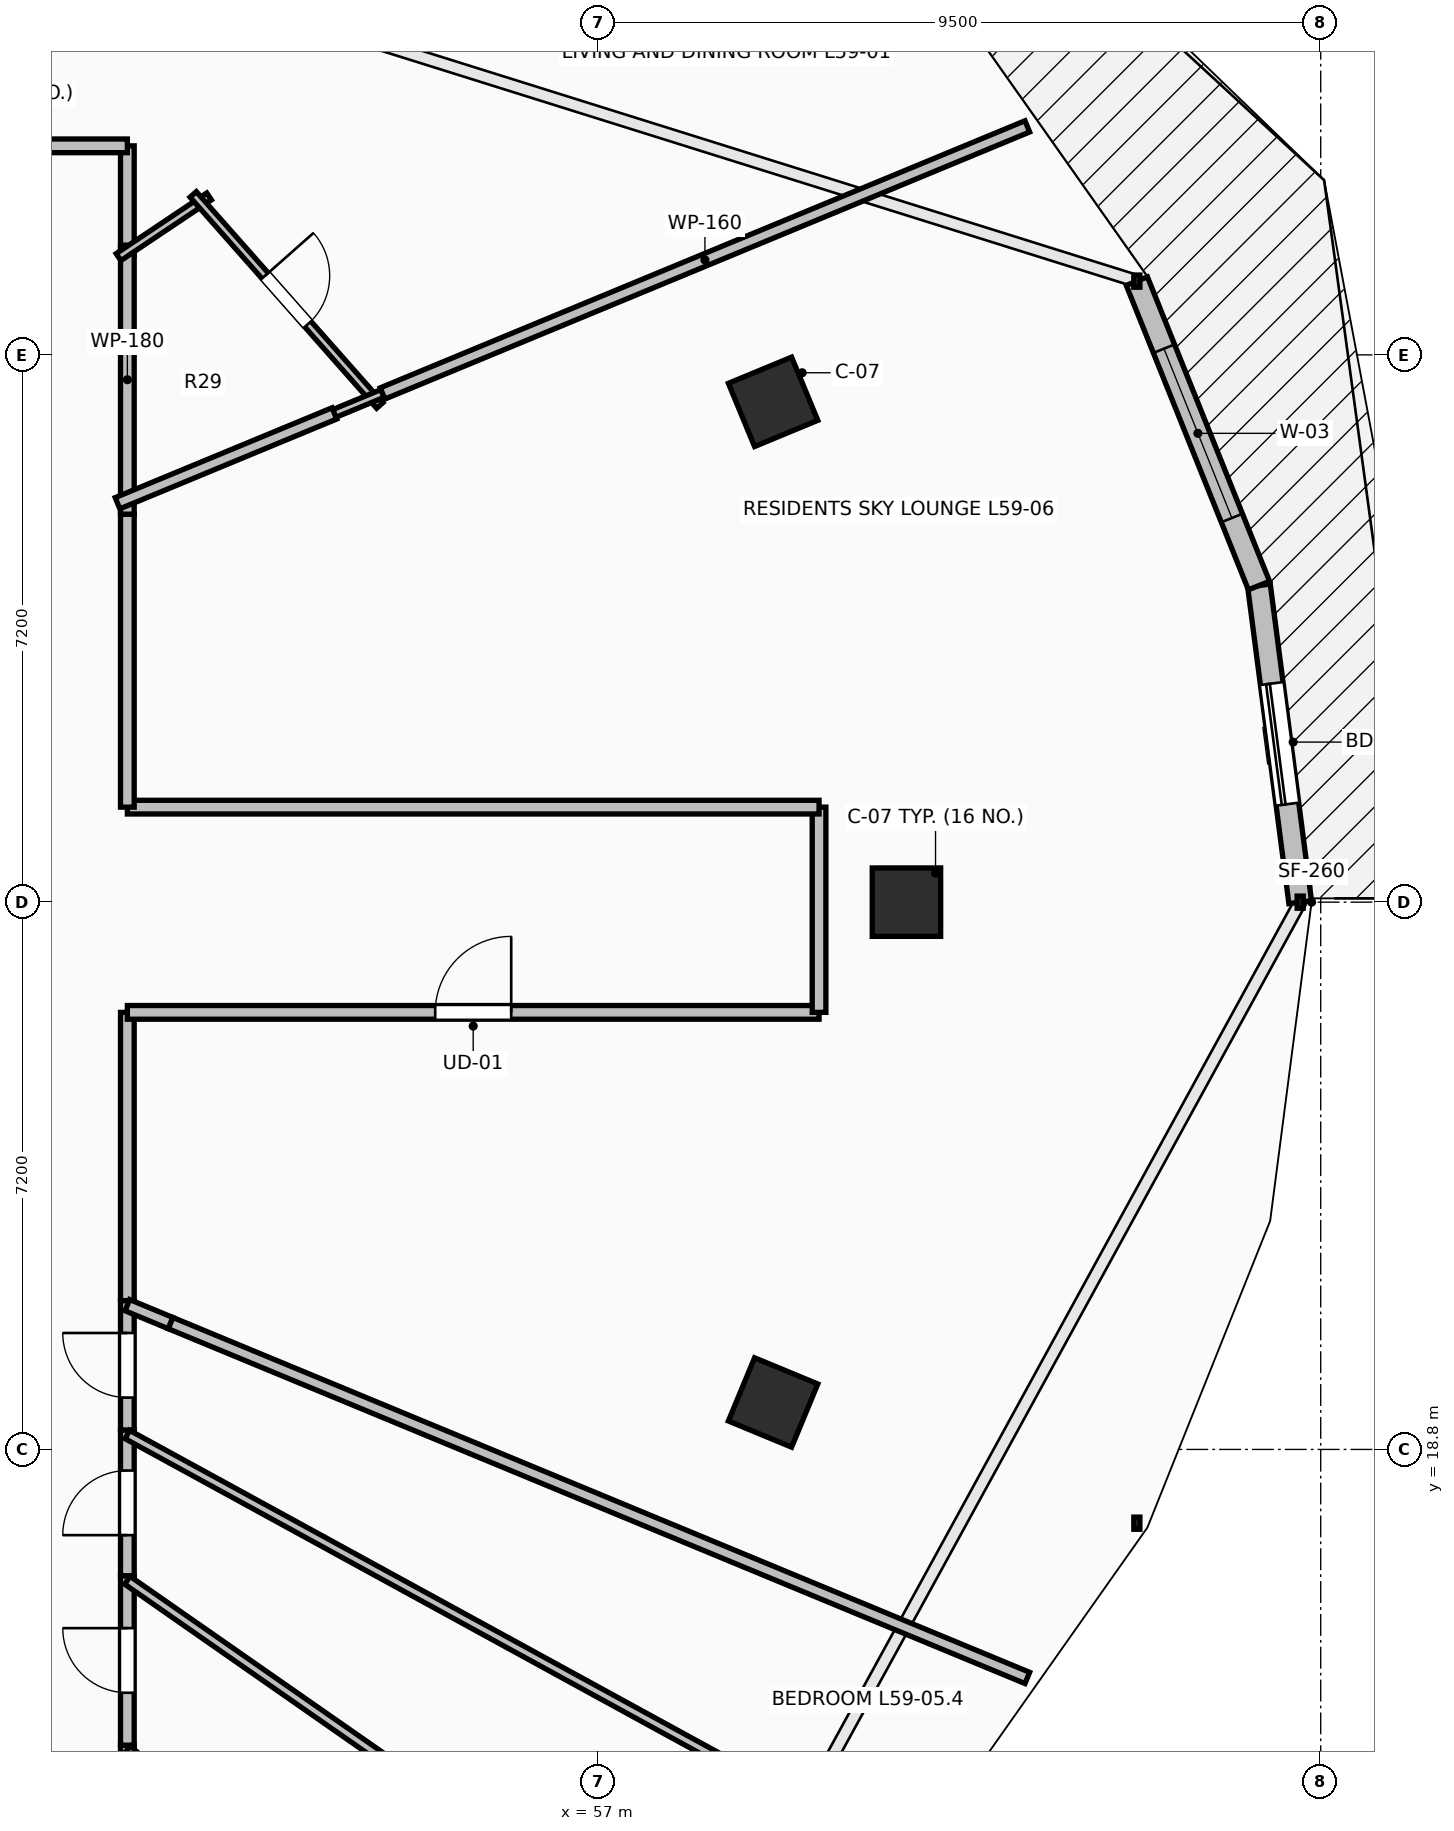
"""IFC4 building model, lengths in metres.
Left out: names, types, materials, properties, quantities, classifications, styles, units other than length and angle.
Written with IfcOpenShell. Run it as: python <this file> out.ifc"""

import sys

from ifc_helpers import new_model, si_unit, direction, frame, frame_2d, origin, origin_2d, place, context, subcontext, project, spatial, rectangle, extrude, element, fill, save


model = new_model("IFC4")
c1 = context("Model", 3, precision=1e-05, world=origin(), true_north=direction((0.0, 1.0)))
c2 = subcontext(c1, "Body", "Model", "MODEL_VIEW")
j1 = project(units=[si_unit("LENGTHUNIT", "METRE"), si_unit("PLANEANGLEUNIT", "RADIAN")], contexts=[c1])
p1 = place(None, origin())
s1 = spatial("IfcSite", under=j1, at=p1, CompositionType="ELEMENT")
p2 = place(p1, origin())
s2 = spatial("IfcBuilding", under=s1, at=p2, CompositionType="ELEMENT")
p3 = place(p2, frame((0.0, 0.0, 217.85)))
s3 = spatial("IfcBuildingStorey", under=s2, at=p3, CompositionType="ELEMENT", Elevation=217.85)
for number, where, z_axis, x_axis in (
    (1, (61.05, 26.0, 0.0), (0.0, 0.0, 1.0), (1.0, 0.0, 0.0)),
    (2, (59.295, 32.582, 0.0), (0.0, 0.0, 1.0), (0.924, 0.383, 0.0)),
    (3, (59.295, 19.418, 0.0), (0.0, 0.0, 1.0), (0.924, -0.383, 0.0)),
):
    element("IfcColumn", number, at=place(p3, frame(where, z_axis=z_axis, x_axis=x_axis)), inside=s3, PredefinedType="COLUMN", context=c2, shape_type="SweptSolid", body=[
        extrude(rectangle(XDim=0.9, YDim=0.9, at=origin_2d()), origin(), (0.0, 0.0, 1.0), 3.55),
    ])
p4 = place(p3, frame((66.23, 26.0, 0.0), z_axis=(0.0, 0.0, 1.0), x_axis=(-0.129147853268, 0.991625348605, 0.0)))
e4 = element("IfcWall", 4, at=p4, inside=s3, PredefinedType="STANDARD", context=c2, shape_type="SweptSolid", body=[
    extrude(rectangle(XDim=4.2, YDim=0.3, at=frame_2d((2.1, 0.0))), origin(), (0.0, 0.0, 1.0), 3.29),
])
p5 = place(p4, frame((1.3, 0.0, 0.0)))
e5 = element("IfcOpeningElement", 5, at=p5, cuts=e4, PredefinedType="OPENING", context=c2, shape_type="SweptSolid", body=[
    extrude(rectangle(XDim=1.6, YDim=2.3, at=frame_2d((0.8, 1.15))), frame((0.0, 0.165, 0.0), z_axis=(0.0, -1.0, 0.0), x_axis=(1.0, 0.0, 0.0)), (0.0, 0.0, 1.0), 0.33),
])
p6 = place(p3, frame((65.688, 30.165, 0.0), z_axis=(0.0, 0.0, 1.0), x_axis=(-0.372268409848, 0.928125116043, 0.0)))
e6 = element("IfcWall", 6, at=p6, inside=s3, PredefinedType="STANDARD", context=c2, shape_type="SweptSolid", body=[
    extrude(rectangle(XDim=4.315, YDim=0.3, at=frame_2d((2.158, 0.0))), origin(), (0.0, 0.0, 1.0), 3.29),
])
p7 = place(p6, frame((0.958, 0.0, 0.85)))
e7 = element("IfcOpeningElement", 7, at=p7, cuts=e6, PredefinedType="OPENING", context=c2, shape_type="SweptSolid", body=[
    extrude(rectangle(XDim=2.4, YDim=2.24, at=frame_2d((1.2, 1.12))), frame((0.0, 0.165, 0.0), z_axis=(0.0, -1.0, 0.0), x_axis=(1.0, 0.0, 0.0)), (0.0, 0.0, 1.0), 0.33),
])
p8 = place(p3, frame((50.8, 34.504, 0.0), z_axis=(0.0, 0.0, 1.0), x_axis=(0.0, 1.0, 0.0)))
e8 = element("IfcWall", 8, at=p8, inside=s3, PredefinedType="PARTITIONING", context=c2, shape_type="SweptSolid", body=[
    extrude(rectangle(XDim=1.446, YDim=0.18, at=frame_2d((0.723, 0.0))), origin(), (0.0, 0.0, 1.0), 2.482),
])
p9 = place(p3, frame((50.8, 35.95, 0.0), z_axis=(0.0, 0.0, 1.0), x_axis=(-1.0, 0.0, 0.0)))
e9 = element("IfcWall", 9, at=p9, inside=s3, PredefinedType="PARTITIONING", context=c2, shape_type="SweptSolid", body=[
    extrude(rectangle(XDim=3.948, YDim=0.18, at=frame_2d((1.974, 0.0))), origin(), (0.0, 0.0, 1.0), 2.482),
])
p10 = place(p9, frame((1.474, 0.0, 0.0)))
e10 = element("IfcOpeningElement", 10, at=p10, cuts=e9, PredefinedType="OPENING", context=c2, shape_type="SweptSolid", body=[
    extrude(rectangle(XDim=1.0, YDim=2.15, at=frame_2d((0.5, 1.075))), frame((0.0, 0.105, 0.0), z_axis=(0.0, -1.0, 0.0), x_axis=(1.0, 0.0, 0.0)), (0.0, 0.0, 1.0), 0.21),
])
p11 = place(p3, frame((50.8, 31.102, 0.0), z_axis=(0.0, 0.0, 1.0), x_axis=(0.0, 1.0, 0.0)))
e11 = element("IfcWall", 11, at=p11, inside=s3, PredefinedType="PARTITIONING", context=c2, shape_type="SweptSolid", body=[
    extrude(rectangle(XDim=3.542, YDim=0.18, at=frame_2d((1.771, 0.0))), origin(), (0.0, 0.0, 1.0), 2.482),
])
p12 = place(p3, frame((50.8, 14.05, 0.0), z_axis=(0.0, 0.0, 1.0), x_axis=(0.0, 1.0, 0.0)))
e12 = element("IfcWall", 12, at=p12, inside=s3, PredefinedType="PARTITIONING", context=c2, shape_type="SweptSolid", body=[
    extrude(rectangle(XDim=0.859, YDim=0.18, at=frame_2d((0.429, 0.0))), origin(), (0.0, 0.0, 1.0), 2.979),
])
p13 = place(p3, frame((50.8, 14.909, 0.0), z_axis=(0.0, 0.0, 1.0), x_axis=(0.0, 1.0, 0.0)))
e13 = element("IfcWall", 13, at=p13, inside=s3, PredefinedType="PARTITIONING", context=c2, shape_type="SweptSolid", body=[
    extrude(rectangle(XDim=2.23, YDim=0.18, at=frame_2d((1.115, 0.0))), origin(), (0.0, 0.0, 1.0), 2.482),
])
p14 = place(p13, frame((0.69, 0.0, 0.0)))
e14 = element("IfcOpeningElement", 14, at=p14, cuts=e13, PredefinedType="OPENING", context=c2, shape_type="SweptSolid", body=[
    extrude(rectangle(XDim=0.85, YDim=2.1, at=frame_2d((0.425, 1.05))), frame((0.0, 0.105, 0.0), z_axis=(0.0, -1.0, 0.0), x_axis=(1.0, 0.0, 0.0)), (0.0, 0.0, 1.0), 0.21),
])
p15 = place(p3, frame((50.8, 17.139, 0.0), z_axis=(0.0, 0.0, 1.0), x_axis=(0.0, 1.0, 0.0)))
e15 = element("IfcWall", 15, at=p15, inside=s3, PredefinedType="PARTITIONING", context=c2, shape_type="SweptSolid", body=[
    extrude(rectangle(XDim=1.917, YDim=0.18, at=frame_2d((0.958, 0.0))), origin(), (0.0, 0.0, 1.0), 3.29),
])
p16 = place(p15, frame((0.533, 0.0, 0.0)))
e16 = element("IfcOpeningElement", 16, at=p16, cuts=e15, PredefinedType="OPENING", context=c2, shape_type="SweptSolid", body=[
    extrude(rectangle(XDim=0.85, YDim=2.1, at=frame_2d((0.425, 1.05))), frame((0.0, 0.105, 0.0), z_axis=(0.0, -1.0, 0.0), x_axis=(1.0, 0.0, 0.0)), (0.0, 0.0, 1.0), 0.21),
])
p17 = place(p3, frame((50.8, 19.056, 0.0), z_axis=(0.0, 0.0, 1.0), x_axis=(0.0, 1.0, 0.0)))
e17 = element("IfcWall", 17, at=p17, inside=s3, PredefinedType="PARTITIONING", context=c2, shape_type="SweptSolid", body=[
    extrude(rectangle(XDim=1.702, YDim=0.18, at=frame_2d((0.851, 0.0))), origin(), (0.0, 0.0, 1.0), 3.29),
])
p18 = place(p17, frame((0.426, 0.0, 0.0)))
e18 = element("IfcOpeningElement", 18, at=p18, cuts=e17, PredefinedType="OPENING", context=c2, shape_type="SweptSolid", body=[
    extrude(rectangle(XDim=0.85, YDim=2.1, at=frame_2d((0.425, 1.05))), frame((0.0, 0.105, 0.0), z_axis=(0.0, -1.0, 0.0), x_axis=(1.0, 0.0, 0.0)), (0.0, 0.0, 1.0), 0.21),
])
p19 = place(p3, frame((50.8, 20.758, 0.0), z_axis=(0.0, 0.0, 1.0), x_axis=(0.0, 1.0, 0.0)))
e19 = element("IfcWall", 19, at=p19, inside=s3, PredefinedType="PARTITIONING", context=c2, shape_type="SweptSolid", body=[
    extrude(rectangle(XDim=3.792, YDim=0.18, at=frame_2d((1.896, 0.0))), origin(), (0.0, 0.0, 1.0), 3.29),
])
p20 = place(p3, frame((50.8, 24.55, 0.0), z_axis=(0.0, 0.0, 1.0), x_axis=(1.0, 0.0, 0.0)))
e20 = element("IfcWall", 20, at=p20, inside=s3, PredefinedType="PARTITIONING", context=c2, shape_type="SweptSolid", body=[
    extrude(rectangle(XDim=9.1, YDim=0.18, at=frame_2d((4.55, 0.0))), origin(), (0.0, 0.0, 1.0), 2.482),
])
p21 = place(p20, frame((4.05, 0.0, 0.0)))
e21 = element("IfcOpeningElement", 21, at=p21, cuts=e20, PredefinedType="OPENING", context=c2, shape_type="SweptSolid", body=[
    extrude(rectangle(XDim=1.0, YDim=2.15, at=frame_2d((0.5, 1.075))), frame((0.0, 0.105, 0.0), z_axis=(0.0, -1.0, 0.0), x_axis=(1.0, 0.0, 0.0)), (0.0, 0.0, 1.0), 0.21),
])
p22 = place(p3, frame((59.9, 24.55, 0.0), z_axis=(0.0, 0.0, 1.0), x_axis=(0.0, 1.0, 0.0)))
e22 = element("IfcWall", 22, at=p22, inside=s3, PredefinedType="PARTITIONING", context=c2, shape_type="SweptSolid", body=[
    extrude(rectangle(XDim=2.7, YDim=0.18, at=frame_2d((1.35, 0.0))), origin(), (0.0, 0.0, 1.0), 2.482),
])
p23 = place(p3, frame((59.9, 27.25, 0.0), z_axis=(0.0, 0.0, 1.0), x_axis=(-1.0, 0.0, 0.0)))
e23 = element("IfcWall", 23, at=p23, inside=s3, PredefinedType="PARTITIONING", context=c2, shape_type="SweptSolid", body=[
    extrude(rectangle(XDim=9.1, YDim=0.18, at=frame_2d((4.55, 0.0))), origin(), (0.0, 0.0, 1.0), 2.482),
])
p24 = place(p3, frame((50.8, 27.25, 0.0), z_axis=(0.0, 0.0, 1.0), x_axis=(0.0, 1.0, 0.0)))
e24 = element("IfcWall", 24, at=p24, inside=s3, PredefinedType="PARTITIONING", context=c2, shape_type="SweptSolid", body=[
    extrude(rectangle(XDim=3.852, YDim=0.18, at=frame_2d((1.926, 0.0))), origin(), (0.0, 0.0, 1.0), 2.482),
])
p25 = place(p3, frame((50.684, 34.486, 0.0), z_axis=(0.0, 0.0, 1.0), x_axis=(0.830948636418, 0.556349138253, 0.0)))
e25 = element("IfcWall", 25, at=p25, inside=s3, PredefinedType="PARTITIONING", context=c2, shape_type="SweptSolid", body=[
    extrude(rectangle(XDim=1.434, YDim=0.11, at=frame_2d((0.717, 0.0))), origin(), (0.0, 0.0, 1.0), 2.924),
])
p26 = place(p3, frame((51.666, 35.311, 0.0), z_axis=(0.0, 0.0, 1.0), x_axis=(0.662288118602, -0.749249256228, 0.0)))
e26 = element("IfcWall", 26, at=p26, inside=s3, PredefinedType="PARTITIONING", context=c2, shape_type="SweptSolid", body=[
    extrude(rectangle(XDim=3.706, YDim=0.11, at=frame_2d((1.853, 0.0))), origin(), (0.0, 0.0, 1.0), 2.482),
])
p27 = place(p26, frame((1.428, 0.0, 0.0)))
e27 = element("IfcOpeningElement", 27, at=p27, cuts=e26, PredefinedType="OPENING", context=c2, shape_type="SweptSolid", body=[
    extrude(rectangle(XDim=0.85, YDim=2.1, at=frame_2d((0.425, 1.05))), frame((0.0, 0.07, 0.0), z_axis=(0.0, -1.0, 0.0), x_axis=(1.0, 0.0, 0.0)), (0.0, 0.0, 1.0), 0.14),
])
p28 = place(p3, frame((54.157, 32.693, 0.0), z_axis=(0.0, 0.0, 1.0), x_axis=(-0.923731903457, -0.383039646166, 0.0)))
e28 = element("IfcWall", 28, at=p28, inside=s3, PredefinedType="PARTITIONING", context=c2, shape_type="SweptSolid", body=[
    extrude(rectangle(XDim=0.825, YDim=0.11, at=frame_2d((0.413, 0.0))), origin(), (0.0, 0.0, 1.0), 2.482),
])
p29 = place(p3, frame((52.34, 42.01, 0.0), z_axis=(0.0, 0.0, 1.0), x_axis=(-0.667173742476, -0.744902139445, 0.0)))
e29 = element("IfcWall", 29, at=p29, inside=s3, PredefinedType="PARTITIONING", context=c2, shape_type="SweptSolid", body=[
    extrude(rectangle(XDim=8.135, YDim=0.125, at=frame_2d((4.067, 0.0))), origin(), (0.0, 0.0, 1.0), 2.482),
])
p30 = place(p29, frame((3.617, 0.0, 0.0)))
e30 = element("IfcOpeningElement", 30, at=p30, cuts=e29, PredefinedType="OPENING", context=c2, shape_type="SweptSolid", body=[
    extrude(rectangle(XDim=0.9, YDim=2.1, at=frame_2d((0.45, 1.05))), frame((0.0, 0.077, 0.0), z_axis=(0.0, -1.0, 0.0), x_axis=(1.0, 0.0, 0.0)), (0.0, 0.0, 1.0), 0.155),
])
p31 = place(p3, frame((54.157, 32.692, 0.0), z_axis=(0.0, 0.0, 1.0), x_axis=(0.923874230192, 0.382696233045, 0.0)))
e31 = element("IfcWall", 31, at=p31, inside=s3, PredefinedType="PARTITIONING", context=c2, shape_type="SweptSolid", body=[
    extrude(rectangle(XDim=9.181, YDim=0.16, at=frame_2d((4.591, 0.0))), origin(), (0.0, 0.0, 1.0), 2.482),
])
p32 = place(p3, frame((50.671, 31.248, 0.0), z_axis=(0.0, 0.0, 1.0), x_axis=(0.923905073908, 0.382621764158, 0.0)))
e32 = element("IfcWall", 32, at=p32, inside=s3, PredefinedType="PARTITIONING", context=c2, shape_type="SweptSolid", body=[
    extrude(rectangle(XDim=3.088, YDim=0.16, at=frame_2d((1.544, 0.0))), origin(), (0.0, 0.0, 1.0), 2.924),
])
p33 = place(p3, frame((51.099, 44.795, 0.0), z_axis=(0.0, 0.0, 1.0), x_axis=(-0.571754326018, -0.82042488424, 0.0)))
e33 = element("IfcWall", 33, at=p33, inside=s3, PredefinedType="PARTITIONING", context=c2, shape_type="SweptSolid", body=[
    extrude(rectangle(XDim=10.781, YDim=0.125, at=frame_2d((5.391, 0.0))), origin(), (0.0, 0.0, 1.0), 2.482),
])
p34 = place(p3, frame((56.422, 9.951, 0.0), z_axis=(0.0, 0.0, 1.0), x_axis=(-0.753978537067, 0.656899052856, 0.0)))
e34 = element("IfcWall", 34, at=p34, inside=s3, PredefinedType="PARTITIONING", context=c2, shape_type="SweptSolid", body=[
    extrude(rectangle(XDim=7.457, YDim=0.125, at=frame_2d((3.728, 0.0))), origin(), (0.0, 0.0, 1.0), 2.824),
])
p35 = place(p3, frame((58.692, 11.578, 0.0), z_axis=(0.0, 0.0, 1.0), x_axis=(-0.820357038452, 0.571851667361, 0.0)))
e35 = element("IfcWall", 35, at=p35, inside=s3, PredefinedType="PARTITIONING", context=c2, shape_type="SweptSolid", body=[
    extrude(rectangle(XDim=9.62, YDim=0.125, at=frame_2d((4.81, 0.0))), origin(), (0.0, 0.0, 1.0), 2.824),
])
p36 = place(p3, frame((60.8, 13.524, 0.0), z_axis=(0.0, 0.0, 1.0), x_axis=(-0.877244884683, 0.480043135871, 0.0)))
e36 = element("IfcWall", 36, at=p36, inside=s3, PredefinedType="PARTITIONING", context=c2, shape_type="SweptSolid", body=[
    extrude(rectangle(XDim=11.399, YDim=0.125, at=frame_2d((5.7, 0.0))), origin(), (0.0, 0.0, 1.0), 2.824),
])
p37 = place(p3, frame((51.369, 20.462, 0.0), z_axis=(0.0, 0.0, 1.0), x_axis=(-0.923615496363, 0.383320251066, 0.0)))
e37 = element("IfcWall", 37, at=p37, inside=s3, PredefinedType="PARTITIONING", context=c2, shape_type="SweptSolid", body=[
    extrude(rectangle(XDim=0.616, YDim=0.16, at=frame_2d((0.308, 0.0))), origin(), (0.0, 0.0, 1.0), 3.29),
])
p38 = place(p3, frame((62.64, 15.794, 0.0), z_axis=(0.0, 0.0, 1.0), x_axis=(-0.923897809723, 0.382639304291, 0.0)))
e38 = element("IfcWall", 38, at=p38, inside=s3, PredefinedType="PARTITIONING", context=c2, shape_type="SweptSolid", body=[
    extrude(rectangle(XDim=12.199, YDim=0.16, at=frame_2d((6.1, 0.0))), origin(), (0.0, 0.0, 1.0), 2.824),
])
p39 = place(p5, origin())
e39 = element("IfcDoor", 39, at=p39, inside=s3, OperationType="SLIDING_TO_LEFT", PredefinedType="DOOR", context=c2, shape_type="SweptSolid", body=[
    extrude(rectangle(XDim=1.6, YDim=2.3, at=frame_2d((0.8, 1.15))), frame((0.0, 0.025, 0.0), z_axis=(0.0, -1.0, 0.0), x_axis=(1.0, 0.0, 0.0)), (0.0, 0.0, 1.0), 0.05),
])
fill(e5, e39)
p40 = place(p7, origin())
e40 = element("IfcWindow", 40, at=p40, inside=s3, PartitioningType="SINGLE_PANEL", PredefinedType="WINDOW", context=c2, shape_type="SweptSolid", body=[
    extrude(rectangle(XDim=2.4, YDim=2.24, at=frame_2d((1.2, 1.12))), frame((0.0, 0.03, 0.0), z_axis=(0.0, -1.0, 0.0), x_axis=(1.0, 0.0, 0.0)), (0.0, 0.0, 1.0), 0.06),
])
fill(e7, e40)
p41 = place(p21, origin())
e41 = element("IfcDoor", 41, at=p41, inside=s3, OperationType="SINGLE_SWING_RIGHT", PredefinedType="DOOR", context=c2, shape_type="SweptSolid", body=[
    extrude(rectangle(XDim=1.0, YDim=2.15, at=frame_2d((0.5, 1.075))), frame((0.0, 0.025, 0.0), z_axis=(0.0, -1.0, 0.0), x_axis=(1.0, 0.0, 0.0)), (0.0, 0.0, 1.0), 0.05),
])
fill(e21, e41)
p42 = place(p27, origin())
e42 = element("IfcDoor", 42, at=p42, inside=s3, OperationType="SINGLE_SWING_LEFT", PredefinedType="DOOR", context=c2, shape_type="SweptSolid", body=[
    extrude(rectangle(XDim=0.85, YDim=2.1, at=frame_2d((0.425, 1.05))), frame((0.0, 0.025, 0.0), z_axis=(0.0, -1.0, 0.0), x_axis=(1.0, 0.0, 0.0)), (0.0, 0.0, 1.0), 0.05),
])
fill(e27, e42)
p43 = place(p14, origin())
e43 = element("IfcDoor", 43, at=p43, inside=s3, OperationType="SINGLE_SWING_RIGHT", PredefinedType="DOOR", context=c2, shape_type="SweptSolid", body=[
    extrude(rectangle(XDim=0.85, YDim=2.1, at=frame_2d((0.425, 1.05))), frame((0.0, 0.025, 0.0), z_axis=(0.0, -1.0, 0.0), x_axis=(1.0, 0.0, 0.0)), (0.0, 0.0, 1.0), 0.05),
])
fill(e14, e43)
p44 = place(p16, origin())
e44 = element("IfcDoor", 44, at=p44, inside=s3, OperationType="SINGLE_SWING_LEFT", PredefinedType="DOOR", context=c2, shape_type="SweptSolid", body=[
    extrude(rectangle(XDim=0.85, YDim=2.1, at=frame_2d((0.425, 1.05))), frame((0.0, 0.025, 0.0), z_axis=(0.0, -1.0, 0.0), x_axis=(1.0, 0.0, 0.0)), (0.0, 0.0, 1.0), 0.05),
])
fill(e16, e44)
p45 = place(p18, origin())
e45 = element("IfcDoor", 45, at=p45, inside=s3, OperationType="SINGLE_SWING_RIGHT", PredefinedType="DOOR", context=c2, shape_type="SweptSolid", body=[
    extrude(rectangle(XDim=0.85, YDim=2.1, at=frame_2d((0.425, 1.05))), frame((0.0, 0.025, 0.0), z_axis=(0.0, -1.0, 0.0), x_axis=(1.0, 0.0, 0.0)), (0.0, 0.0, 1.0), 0.05),
])
fill(e18, e45)
save(model, sys.argv[1])
